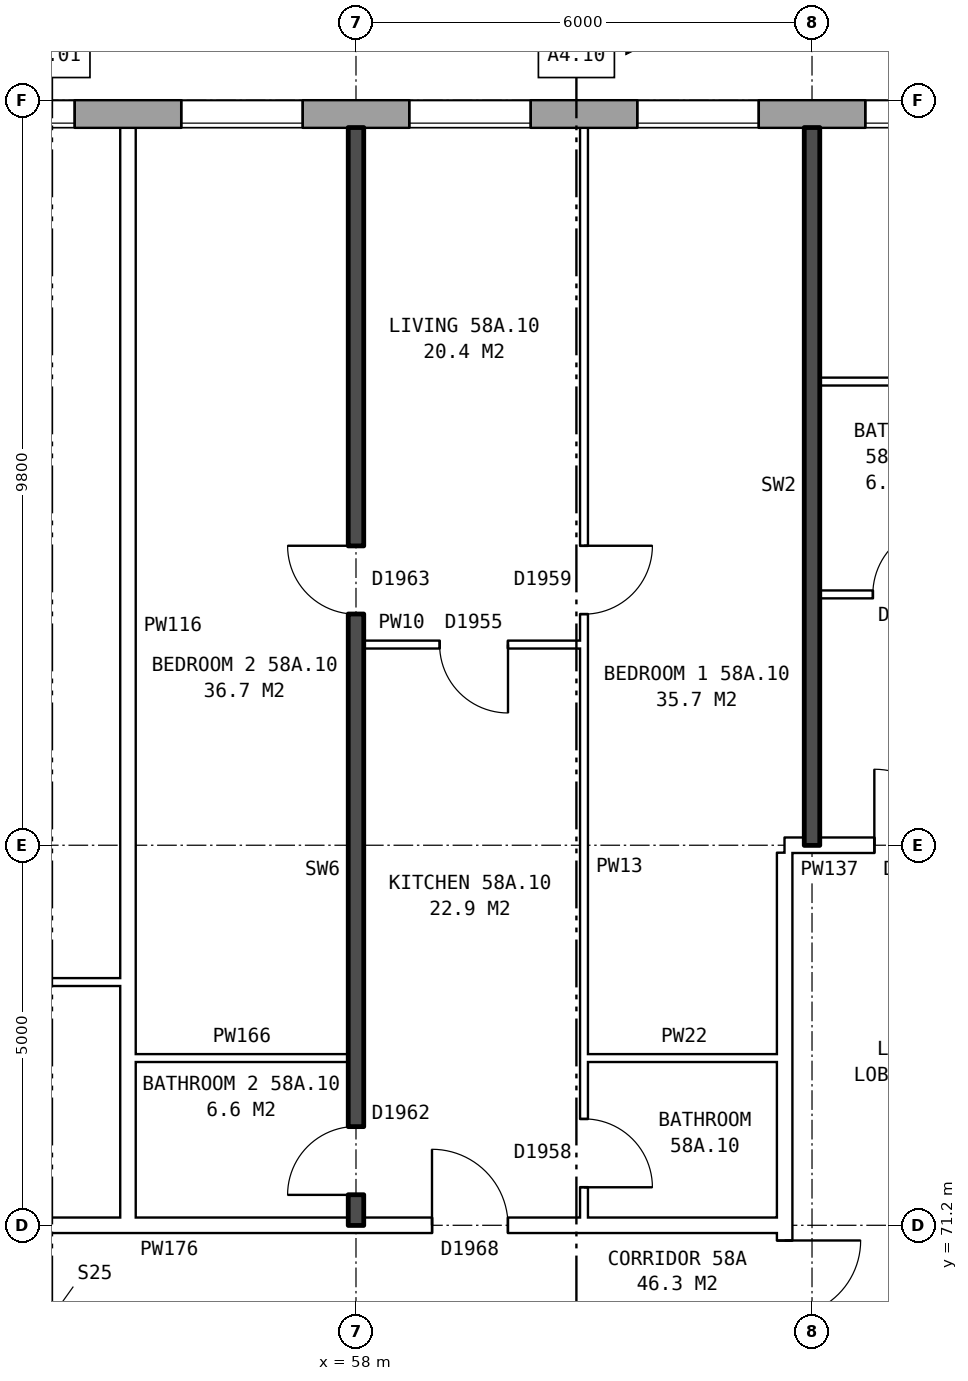
"""IFC4 building model, lengths in metres.
Left out: names, types, materials, properties, quantities, classifications, styles, units other than length and angle.
Written with IfcOpenShell. Run it as: python <this file> out.ifc"""

import sys

from ifc_helpers import new_model, si_unit, direction, frame, frame_2d, origin, place, context, subcontext, project, spatial, rectangle, extrude, element, fill, save


model = new_model("IFC4")
c1 = context("Model", 3, precision=1e-05, world=origin(), true_north=direction((0.0, 1.0)))
c2 = subcontext(c1, "Body", "Model", "MODEL_VIEW")
j1 = project(units=[si_unit("LENGTHUNIT", "METRE"), si_unit("PLANEANGLEUNIT", "RADIAN")], contexts=[c1])
p1 = place(None, origin())
s1 = spatial("IfcSite", under=j1, at=p1, CompositionType="ELEMENT")
p2 = place(p1, origin())
s2 = spatial("IfcBuilding", under=s1, at=p2, CompositionType="ELEMENT")
p3 = place(p2, frame((0.0, 0.0, 205.9)))
s3 = spatial("IfcBuildingStorey", under=s2, at=p3, CompositionType="ELEMENT", Elevation=205.9)
p4 = place(p3, frame((74.95, 85.82, 0.0), z_axis=(0.0, 0.0, 1.0), x_axis=(-1.0, 0.0, 0.0)))
e1 = element("IfcWall", 1, at=p4, inside=s3, PredefinedType="STANDARD", context=c2, shape_type="SweptSolid", body=[
    extrude(rectangle(XDim=39.875, YDim=0.36, at=frame_2d((19.938, 0.0))), origin(), (0.0, 0.0, 1.0), 2.85),
])
p5 = place(p4, frame((0.3, 0.0, 0.8)))
e2 = element("IfcOpeningElement", 2, at=p5, cuts=e1, PredefinedType="OPENING", context=c2, shape_type="SweptSolid", body=[
    extrude(rectangle(XDim=1.0, YDim=1.8, at=frame_2d((0.5, 0.9))), frame((0.0, 0.19, 0.0), z_axis=(0.0, -1.0, 0.0), x_axis=(1.0, 0.0, 0.0)), (0.0, 0.0, 1.0), 0.38),
])
p6 = place(p4, frame((5.65, 0.0, 0.8)))
e3 = element("IfcOpeningElement", 3, at=p6, cuts=e1, PredefinedType="OPENING", context=c2, shape_type="SweptSolid", body=[
    extrude(rectangle(XDim=1.6, YDim=1.8, at=frame_2d((0.8, 0.9))), frame((0.0, 0.19, 0.0), z_axis=(0.0, -1.0, 0.0), x_axis=(1.0, 0.0, 0.0)), (0.0, 0.0, 1.0), 0.38),
])
p7 = place(p4, frame((8.65, 0.0, 0.8)))
e4 = element("IfcOpeningElement", 4, at=p7, cuts=e1, PredefinedType="OPENING", context=c2, shape_type="SweptSolid", body=[
    extrude(rectangle(XDim=1.6, YDim=1.8, at=frame_2d((0.8, 0.9))), frame((0.0, 0.19, 0.0), z_axis=(0.0, -1.0, 0.0), x_axis=(1.0, 0.0, 0.0)), (0.0, 0.0, 1.0), 0.38),
])
p8 = place(p4, frame((11.65, 0.0, 0.8)))
e5 = element("IfcOpeningElement", 5, at=p8, cuts=e1, PredefinedType="OPENING", context=c2, shape_type="SweptSolid", body=[
    extrude(rectangle(XDim=1.6, YDim=1.8, at=frame_2d((0.8, 0.9))), frame((0.0, 0.19, 0.0), z_axis=(0.0, -1.0, 0.0), x_axis=(1.0, 0.0, 0.0)), (0.0, 0.0, 1.0), 0.38),
])
p9 = place(p4, frame((14.65, 0.0, 0.8)))
e6 = element("IfcOpeningElement", 6, at=p9, cuts=e1, PredefinedType="OPENING", context=c2, shape_type="SweptSolid", body=[
    extrude(rectangle(XDim=1.6, YDim=1.8, at=frame_2d((0.8, 0.9))), frame((0.0, 0.19, 0.0), z_axis=(0.0, -1.0, 0.0), x_axis=(1.0, 0.0, 0.0)), (0.0, 0.0, 1.0), 0.38),
])
p10 = place(p4, frame((17.65, 0.0, 0.8)))
e7 = element("IfcOpeningElement", 7, at=p10, cuts=e1, PredefinedType="OPENING", context=c2, shape_type="SweptSolid", body=[
    extrude(rectangle(XDim=1.6, YDim=1.8, at=frame_2d((0.8, 0.9))), frame((0.0, 0.19, 0.0), z_axis=(0.0, -1.0, 0.0), x_axis=(1.0, 0.0, 0.0)), (0.0, 0.0, 1.0), 0.38),
])
p11 = place(p4, frame((20.65, 0.0, 0.8)))
e8 = element("IfcOpeningElement", 8, at=p11, cuts=e1, PredefinedType="OPENING", context=c2, shape_type="SweptSolid", body=[
    extrude(rectangle(XDim=1.6, YDim=1.8, at=frame_2d((0.8, 0.9))), frame((0.0, 0.19, 0.0), z_axis=(0.0, -1.0, 0.0), x_axis=(1.0, 0.0, 0.0)), (0.0, 0.0, 1.0), 0.38),
])
p12 = place(p4, frame((23.65, 0.0, 0.8)))
e9 = element("IfcOpeningElement", 9, at=p12, cuts=e1, PredefinedType="OPENING", context=c2, shape_type="SweptSolid", body=[
    extrude(rectangle(XDim=1.6, YDim=1.8, at=frame_2d((0.8, 0.9))), frame((0.0, 0.19, 0.0), z_axis=(0.0, -1.0, 0.0), x_axis=(1.0, 0.0, 0.0)), (0.0, 0.0, 1.0), 0.38),
])
p13 = place(p4, frame((26.65, 0.0, 0.8)))
e10 = element("IfcOpeningElement", 10, at=p13, cuts=e1, PredefinedType="OPENING", context=c2, shape_type="SweptSolid", body=[
    extrude(rectangle(XDim=1.6, YDim=1.8, at=frame_2d((0.8, 0.9))), frame((0.0, 0.19, 0.0), z_axis=(0.0, -1.0, 0.0), x_axis=(1.0, 0.0, 0.0)), (0.0, 0.0, 1.0), 0.38),
])
p14 = place(p4, frame((29.65, 0.0, 0.8)))
e11 = element("IfcOpeningElement", 11, at=p14, cuts=e1, PredefinedType="OPENING", context=c2, shape_type="SweptSolid", body=[
    extrude(rectangle(XDim=1.6, YDim=1.8, at=frame_2d((0.8, 0.9))), frame((0.0, 0.19, 0.0), z_axis=(0.0, -1.0, 0.0), x_axis=(1.0, 0.0, 0.0)), (0.0, 0.0, 1.0), 0.38),
])
p15 = place(p4, frame((32.65, 0.0, 0.8)))
e12 = element("IfcOpeningElement", 12, at=p15, cuts=e1, PredefinedType="OPENING", context=c2, shape_type="SweptSolid", body=[
    extrude(rectangle(XDim=1.6, YDim=1.8, at=frame_2d((0.8, 0.9))), frame((0.0, 0.19, 0.0), z_axis=(0.0, -1.0, 0.0), x_axis=(1.0, 0.0, 0.0)), (0.0, 0.0, 1.0), 0.38),
])
p16 = place(p4, frame((35.65, 0.0, 0.8)))
e13 = element("IfcOpeningElement", 13, at=p16, cuts=e1, PredefinedType="OPENING", context=c2, shape_type="SweptSolid", body=[
    extrude(rectangle(XDim=1.6, YDim=1.8, at=frame_2d((0.8, 0.9))), frame((0.0, 0.19, 0.0), z_axis=(0.0, -1.0, 0.0), x_axis=(1.0, 0.0, 0.0)), (0.0, 0.0, 1.0), 0.38),
])
p17 = place(p4, frame((3.7, 0.0, 0.8)))
e14 = element("IfcOpeningElement", 14, at=p17, cuts=e1, PredefinedType="OPENING", context=c2, shape_type="SweptSolid", body=[
    extrude(rectangle(XDim=1.0, YDim=1.8, at=frame_2d((0.5, 0.9))), frame((0.0, 0.19, 0.0), z_axis=(0.0, -1.0, 0.0), x_axis=(1.0, 0.0, 0.0)), (0.0, 0.0, 1.0), 0.38),
])
p18 = place(p3, frame((63.64, 63.9, 0.0), z_axis=(0.0, 0.0, 1.0), x_axis=(0.0, 1.0, 0.0)))
e15 = element("IfcWall", 15, at=p18, inside=s3, PredefinedType="PARTITIONING", context=c2, shape_type="SweptSolid", body=[
    extrude(rectangle(XDim=12.2, YDim=0.2, at=frame_2d((6.1, 0.0))), origin(), (0.0, 0.0, 1.0), 2.85),
])
p19 = place(p18, frame((5.1, 0.0, 0.0)))
e16 = element("IfcOpeningElement", 16, at=p19, cuts=e15, PredefinedType="OPENING", context=c2, shape_type="SweptSolid", body=[
    extrude(rectangle(XDim=2.0, YDim=2.1, at=frame_2d((1.0, 1.05))), frame((0.0, 0.11, 0.0), z_axis=(0.0, -1.0, 0.0), x_axis=(1.0, 0.0, 0.0)), (0.0, 0.0, 1.0), 0.22),
])
p20 = place(p3, frame((44.36, 71.2, 0.0), z_axis=(0.0, 0.0, 1.0), x_axis=(1.0, 0.0, 0.0)))
e17 = element("IfcWall", 17, at=p20, inside=s3, PredefinedType="PARTITIONING", context=c2, shape_type="SweptSolid", body=[
    extrude(rectangle(XDim=19.28, YDim=0.2, at=frame_2d((9.64, 0.0))), origin(), (0.0, 0.0, 1.0), 2.85),
])
p21 = place(p20, frame((14.64, 0.0, 0.0)))
e18 = element("IfcOpeningElement", 18, at=p21, cuts=e17, PredefinedType="OPENING", context=c2, shape_type="SweptSolid", body=[
    extrude(rectangle(XDim=1.0, YDim=2.1, at=frame_2d((0.5, 1.05))), frame((0.0, 0.11, 0.0), z_axis=(0.0, -1.0, 0.0), x_axis=(1.0, 0.0, 0.0)), (0.0, 0.0, 1.0), 0.22),
])
p22 = place(p20, frame((5.64, 0.0, 0.0)))
e19 = element("IfcOpeningElement", 19, at=p22, cuts=e17, PredefinedType="OPENING", context=c2, shape_type="SweptSolid", body=[
    extrude(rectangle(XDim=1.0, YDim=2.1, at=frame_2d((0.5, 1.05))), frame((0.0, 0.11, 0.0), z_axis=(0.0, -1.0, 0.0), x_axis=(1.0, 0.0, 0.0)), (0.0, 0.0, 1.0), 0.22),
])
p23 = place(p3, frame((55.1, 73.4, 0.0), z_axis=(0.0, 0.0, 1.0), x_axis=(1.0, 0.0, 0.0)))
e20 = element("IfcWall", 20, at=p23, inside=s3, PredefinedType="PARTITIONING", context=c2, shape_type="SweptSolid", body=[
    extrude(rectangle(XDim=2.8, YDim=0.1, at=frame_2d((1.4, 0.0))), origin(), (0.0, 0.0, 1.0), 2.85),
])
p24 = place(p3, frame((61.0, 73.4, 0.0), z_axis=(0.0, 0.0, 1.0), x_axis=(1.0, 0.0, 0.0)))
e21 = element("IfcWall", 21, at=p24, inside=s3, PredefinedType="PARTITIONING", context=c2, shape_type="SweptSolid", body=[
    extrude(rectangle(XDim=2.64, YDim=0.1, at=frame_2d((1.32, 0.0))), origin(), (0.0, 0.0, 1.0), 2.85),
])
p25 = place(p3, frame((52.1, 74.4, 0.0), z_axis=(0.0, 0.0, 1.0), x_axis=(1.0, 0.0, 0.0)))
e22 = element("IfcWall", 22, at=p25, inside=s3, PredefinedType="PARTITIONING", context=c2, shape_type="SweptSolid", body=[
    extrude(rectangle(XDim=2.8, YDim=0.1, at=frame_2d((1.4, 0.0))), origin(), (0.0, 0.0, 1.0), 2.85),
])
p26 = place(p3, frame((63.64, 76.2, 0.0), z_axis=(0.0, 0.0, 1.0), x_axis=(1.0, 0.0, 0.0)))
e23 = element("IfcWall", 23, at=p26, inside=s3, PredefinedType="PARTITIONING", context=c2, shape_type="SweptSolid", body=[
    extrude(rectangle(XDim=3.0, YDim=0.2, at=frame_2d((1.5, 0.0))), origin(), (0.0, 0.0, 1.0), 2.85),
])
p27 = place(p26, frame((1.18, 0.0, 0.0)))
e24 = element("IfcOpeningElement", 24, at=p27, cuts=e23, PredefinedType="OPENING", context=c2, shape_type="SweptSolid", body=[
    extrude(rectangle(XDim=1.0, YDim=2.1, at=frame_2d((0.5, 1.05))), frame((0.0, 0.11, 0.0), z_axis=(0.0, -1.0, 0.0), x_axis=(1.0, 0.0, 0.0)), (0.0, 0.0, 1.0), 0.22),
])
p28 = place(p3, frame((58.1, 78.84, 0.0), z_axis=(0.0, 0.0, 1.0), x_axis=(1.0, 0.0, 0.0)))
e25 = element("IfcWall", 25, at=p28, inside=s3, PredefinedType="PARTITIONING", context=c2, shape_type="SweptSolid", body=[
    extrude(rectangle(XDim=2.9, YDim=0.1, at=frame_2d((1.45, 0.0))), origin(), (0.0, 0.0, 1.0), 2.85),
])
p29 = place(p28, frame((1.0, 0.0, 0.0)))
e26 = element("IfcOpeningElement", 26, at=p29, cuts=e25, PredefinedType="OPENING", context=c2, shape_type="SweptSolid", body=[
    extrude(rectangle(XDim=0.9, YDim=2.1, at=frame_2d((0.45, 1.05))), frame((0.0, 0.06, 0.0), z_axis=(0.0, -1.0, 0.0), x_axis=(1.0, 0.0, 0.0)), (0.0, 0.0, 1.0), 0.12),
])
p30 = place(p3, frame((64.1, 79.5, 0.0), z_axis=(0.0, 0.0, 1.0), x_axis=(1.0, 0.0, 0.0)))
e27 = element("IfcWall", 27, at=p30, inside=s3, PredefinedType="PARTITIONING", context=c2, shape_type="SweptSolid", body=[
    extrude(rectangle(XDim=11.8, YDim=0.1, at=frame_2d((5.9, 0.0))), origin(), (0.0, 0.0, 1.0), 2.85),
])
p31 = place(p30, frame((3.65, 0.0, 0.0)))
e28 = element("IfcOpeningElement", 28, at=p31, cuts=e27, PredefinedType="OPENING", context=c2, shape_type="SweptSolid", body=[
    extrude(rectangle(XDim=0.9, YDim=2.1, at=frame_2d((0.45, 1.05))), frame((0.0, 0.06, 0.0), z_axis=(0.0, -1.0, 0.0), x_axis=(1.0, 0.0, 0.0)), (0.0, 0.0, 1.0), 0.12),
])
p32 = place(p30, frame((0.7, 0.0, 0.0)))
e29 = element("IfcOpeningElement", 29, at=p32, cuts=e27, PredefinedType="OPENING", context=c2, shape_type="SweptSolid", body=[
    extrude(rectangle(XDim=0.9, YDim=2.1, at=frame_2d((0.45, 1.05))), frame((0.0, 0.06, 0.0), z_axis=(0.0, -1.0, 0.0), x_axis=(1.0, 0.0, 0.0)), (0.0, 0.0, 1.0), 0.12),
])
p33 = place(p3, frame((64.1, 82.3, 0.0), z_axis=(0.0, 0.0, 1.0), x_axis=(1.0, 0.0, 0.0)))
e30 = element("IfcWall", 30, at=p33, inside=s3, PredefinedType="PARTITIONING", context=c2, shape_type="SweptSolid", body=[
    extrude(rectangle(XDim=2.3, YDim=0.1, at=frame_2d((1.15, 0.0))), origin(), (0.0, 0.0, 1.0), 2.85),
])
p34 = place(p3, frame((55.0, 71.3, 0.0), z_axis=(0.0, 0.0, 1.0), x_axis=(0.0, 1.0, 0.0)))
e31 = element("IfcWall", 31, at=p34, inside=s3, PredefinedType="PARTITIONING", context=c2, shape_type="SweptSolid", body=[
    extrude(rectangle(XDim=14.34, YDim=0.2, at=frame_2d((7.17, 0.0))), origin(), (0.0, 0.0, 1.0), 2.85),
])
p35 = place(p3, frame((58.0, 71.2, 0.0), z_axis=(0.0, 0.0, 1.0), x_axis=(0.0, 1.0, 0.0)))
e32 = element("IfcWall", 32, at=p35, inside=s3, PredefinedType="SOLIDWALL", context=c2, shape_type="SweptSolid", body=[
    extrude(rectangle(XDim=14.44, YDim=0.2, at=frame_2d((7.22, 0.0))), origin(), (0.0, 0.0, 1.0), 2.85),
])
p36 = place(p35, frame((8.04, 0.0, 0.0)))
e33 = element("IfcOpeningElement", 33, at=p36, cuts=e32, PredefinedType="OPENING", context=c2, shape_type="SweptSolid", body=[
    extrude(rectangle(XDim=0.9, YDim=2.1, at=frame_2d((0.45, 1.05))), frame((0.0, 0.11, 0.0), z_axis=(0.0, -1.0, 0.0), x_axis=(1.0, 0.0, 0.0)), (0.0, 0.0, 1.0), 0.22),
])
p37 = place(p35, frame((0.4, 0.0, 0.0)))
e34 = element("IfcOpeningElement", 34, at=p37, cuts=e32, PredefinedType="OPENING", context=c2, shape_type="SweptSolid", body=[
    extrude(rectangle(XDim=0.9, YDim=2.1, at=frame_2d((0.45, 1.05))), frame((0.0, 0.11, 0.0), z_axis=(0.0, -1.0, 0.0), x_axis=(1.0, 0.0, 0.0)), (0.0, 0.0, 1.0), 0.22),
])
p38 = place(p3, frame((61.0, 71.3, 0.0), z_axis=(0.0, 0.0, 1.0), x_axis=(0.0, 1.0, 0.0)))
e35 = element("IfcWall", 35, at=p38, inside=s3, PredefinedType="PARTITIONING", context=c2, shape_type="SweptSolid", body=[
    extrude(rectangle(XDim=14.34, YDim=0.1, at=frame_2d((7.17, 0.0))), origin(), (0.0, 0.0, 1.0), 2.85),
])
p39 = place(p38, frame((7.94, 0.0, 0.0)))
e36 = element("IfcOpeningElement", 36, at=p39, cuts=e35, PredefinedType="OPENING", context=c2, shape_type="SweptSolid", body=[
    extrude(rectangle(XDim=0.9, YDim=2.1, at=frame_2d((0.45, 1.05))), frame((0.0, 0.06, 0.0), z_axis=(0.0, -1.0, 0.0), x_axis=(1.0, 0.0, 0.0)), (0.0, 0.0, 1.0), 0.12),
])
p40 = place(p38, frame((0.4, 0.0, 0.0)))
e37 = element("IfcOpeningElement", 37, at=p40, cuts=e35, PredefinedType="OPENING", context=c2, shape_type="SweptSolid", body=[
    extrude(rectangle(XDim=0.9, YDim=2.1, at=frame_2d((0.45, 1.05))), frame((0.0, 0.06, 0.0), z_axis=(0.0, -1.0, 0.0), x_axis=(1.0, 0.0, 0.0)), (0.0, 0.0, 1.0), 0.12),
])
p41 = place(p3, frame((64.0, 76.2, 0.0), z_axis=(0.0, 0.0, 1.0), x_axis=(0.0, 1.0, 0.0)))
e38 = element("IfcWall", 38, at=p41, inside=s3, PredefinedType="SOLIDWALL", context=c2, shape_type="SweptSolid", body=[
    extrude(rectangle(XDim=9.44, YDim=0.2, at=frame_2d((4.72, 0.0))), origin(), (0.0, 0.0, 1.0), 2.85),
])
p42 = place(p7, origin())
e39 = element("IfcWindow", 39, at=p42, inside=s3, PartitioningType="SINGLE_PANEL", PredefinedType="WINDOW", context=c2, shape_type="SweptSolid", body=[
    extrude(rectangle(XDim=1.6, YDim=1.8, at=frame_2d((0.8, 0.9))), frame((0.0, 0.15, 0.0), z_axis=(0.0, -1.0, 0.0), x_axis=(1.0, 0.0, 0.0)), (0.0, 0.0, 1.0), 0.06),
])
fill(e4, e39)
p43 = place(p8, origin())
e40 = element("IfcWindow", 40, at=p43, inside=s3, PartitioningType="SINGLE_PANEL", PredefinedType="WINDOW", context=c2, shape_type="SweptSolid", body=[
    extrude(rectangle(XDim=1.6, YDim=1.8, at=frame_2d((0.8, 0.9))), frame((0.0, 0.15, 0.0), z_axis=(0.0, -1.0, 0.0), x_axis=(1.0, 0.0, 0.0)), (0.0, 0.0, 1.0), 0.06),
])
fill(e5, e40)
p44 = place(p9, origin())
e41 = element("IfcWindow", 41, at=p44, inside=s3, PartitioningType="SINGLE_PANEL", PredefinedType="WINDOW", context=c2, shape_type="SweptSolid", body=[
    extrude(rectangle(XDim=1.6, YDim=1.8, at=frame_2d((0.8, 0.9))), frame((0.0, 0.15, 0.0), z_axis=(0.0, -1.0, 0.0), x_axis=(1.0, 0.0, 0.0)), (0.0, 0.0, 1.0), 0.06),
])
fill(e6, e41)
p45 = place(p10, origin())
e42 = element("IfcWindow", 42, at=p45, inside=s3, PartitioningType="SINGLE_PANEL", PredefinedType="WINDOW", context=c2, shape_type="SweptSolid", body=[
    extrude(rectangle(XDim=1.6, YDim=1.8, at=frame_2d((0.8, 0.9))), frame((0.0, 0.15, 0.0), z_axis=(0.0, -1.0, 0.0), x_axis=(1.0, 0.0, 0.0)), (0.0, 0.0, 1.0), 0.06),
])
fill(e7, e42)
p46 = place(p11, origin())
e43 = element("IfcWindow", 43, at=p46, inside=s3, PartitioningType="SINGLE_PANEL", PredefinedType="WINDOW", context=c2, shape_type="SweptSolid", body=[
    extrude(rectangle(XDim=1.6, YDim=1.8, at=frame_2d((0.8, 0.9))), frame((0.0, 0.15, 0.0), z_axis=(0.0, -1.0, 0.0), x_axis=(1.0, 0.0, 0.0)), (0.0, 0.0, 1.0), 0.06),
])
fill(e8, e43)
p47 = place(p19, frame((2.0, 0.0, 0.0), z_axis=(0.0, 0.0, 1.0), x_axis=(-1.0, 0.0, 0.0)))
e44 = element("IfcDoor", 44, at=p47, inside=s3, OperationType="DOUBLE_DOOR_SINGLE_SWING", PredefinedType="DOOR", context=c2, shape_type="SweptSolid", body=[
    extrude(rectangle(XDim=2.0, YDim=2.1, at=frame_2d((1.0, 1.05))), frame((0.0, 0.025, 0.0), z_axis=(0.0, -1.0, 0.0), x_axis=(1.0, 0.0, 0.0)), (0.0, 0.0, 1.0), 0.05),
])
fill(e16, e44)
p48 = place(p27, origin())
e45 = element("IfcDoor", 45, at=p48, inside=s3, OperationType="SINGLE_SWING_LEFT", PredefinedType="DOOR", context=c2, shape_type="SweptSolid", body=[
    extrude(rectangle(XDim=1.0, YDim=2.1, at=frame_2d((0.5, 1.05))), frame((0.0, 0.025, 0.0), z_axis=(0.0, -1.0, 0.0), x_axis=(1.0, 0.0, 0.0)), (0.0, 0.0, 1.0), 0.05),
])
fill(e24, e45)
p49 = place(p32, origin())
e46 = element("IfcDoor", 46, at=p49, inside=s3, OperationType="SINGLE_SWING_RIGHT", PredefinedType="DOOR", context=c2, shape_type="SweptSolid", body=[
    extrude(rectangle(XDim=0.9, YDim=2.1, at=frame_2d((0.45, 1.05))), frame((0.0, 0.025, 0.0), z_axis=(0.0, -1.0, 0.0), x_axis=(1.0, 0.0, 0.0)), (0.0, 0.0, 1.0), 0.05),
])
fill(e29, e46)
p50 = place(p39, frame((0.9, 0.0, 0.0), z_axis=(0.0, 0.0, 1.0), x_axis=(-1.0, 0.0, 0.0)))
e47 = element("IfcDoor", 47, at=p50, inside=s3, OperationType="SINGLE_SWING_LEFT", PredefinedType="DOOR", context=c2, shape_type="SweptSolid", body=[
    extrude(rectangle(XDim=0.9, YDim=2.1, at=frame_2d((0.45, 1.05))), frame((0.0, 0.025, 0.0), z_axis=(0.0, -1.0, 0.0), x_axis=(1.0, 0.0, 0.0)), (0.0, 0.0, 1.0), 0.05),
])
fill(e36, e47)
p51 = place(p36, origin())
e48 = element("IfcDoor", 48, at=p51, inside=s3, OperationType="SINGLE_SWING_RIGHT", PredefinedType="DOOR", context=c2, shape_type="SweptSolid", body=[
    extrude(rectangle(XDim=0.9, YDim=2.1, at=frame_2d((0.45, 1.05))), frame((0.0, 0.025, 0.0), z_axis=(0.0, -1.0, 0.0), x_axis=(1.0, 0.0, 0.0)), (0.0, 0.0, 1.0), 0.05),
])
fill(e33, e48)
p52 = place(p21, origin())
e49 = element("IfcDoor", 49, at=p52, inside=s3, OperationType="SINGLE_SWING_LEFT", PredefinedType="DOOR", context=c2, shape_type="SweptSolid", body=[
    extrude(rectangle(XDim=1.0, YDim=2.1, at=frame_2d((0.5, 1.05))), frame((0.0, 0.025, 0.0), z_axis=(0.0, -1.0, 0.0), x_axis=(1.0, 0.0, 0.0)), (0.0, 0.0, 1.0), 0.05),
])
fill(e18, e49)
p53 = place(p29, frame((0.9, 0.0, 0.0), z_axis=(0.0, 0.0, 1.0), x_axis=(-1.0, 0.0, 0.0)))
e50 = element("IfcDoor", 50, at=p53, inside=s3, OperationType="SINGLE_SWING_LEFT", PredefinedType="DOOR", context=c2, shape_type="SweptSolid", body=[
    extrude(rectangle(XDim=0.9, YDim=2.1, at=frame_2d((0.45, 1.05))), frame((0.0, 0.025, 0.0), z_axis=(0.0, -1.0, 0.0), x_axis=(1.0, 0.0, 0.0)), (0.0, 0.0, 1.0), 0.05),
])
fill(e26, e50)
p54 = place(p40, frame((0.9, 0.0, 0.0), z_axis=(0.0, 0.0, 1.0), x_axis=(-1.0, 0.0, 0.0)))
e51 = element("IfcDoor", 51, at=p54, inside=s3, OperationType="SINGLE_SWING_RIGHT", PredefinedType="DOOR", context=c2, shape_type="SweptSolid", body=[
    extrude(rectangle(XDim=0.9, YDim=2.1, at=frame_2d((0.45, 1.05))), frame((0.0, 0.025, 0.0), z_axis=(0.0, -1.0, 0.0), x_axis=(1.0, 0.0, 0.0)), (0.0, 0.0, 1.0), 0.05),
])
fill(e37, e51)
p55 = place(p37, origin())
e52 = element("IfcDoor", 52, at=p55, inside=s3, OperationType="SINGLE_SWING_LEFT", PredefinedType="DOOR", context=c2, shape_type="SweptSolid", body=[
    extrude(rectangle(XDim=0.9, YDim=2.1, at=frame_2d((0.45, 1.05))), frame((0.0, 0.025, 0.0), z_axis=(0.0, -1.0, 0.0), x_axis=(1.0, 0.0, 0.0)), (0.0, 0.0, 1.0), 0.05),
])
fill(e34, e52)
save(model, sys.argv[1])
